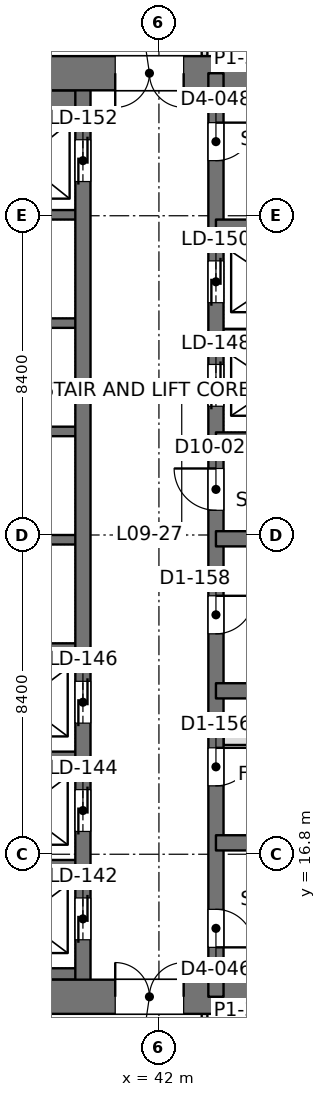
"""IFC4 building model, lengths in metres.
Left out: names, types, materials, properties, quantities, classifications, styles, units other than length and angle.
Written with IfcOpenShell. Run it as: python <this file> out.ifc"""

import sys

from ifc_helpers import new_model, si_unit, direction, frame, frame_2d, origin, place, context, subcontext, project, spatial, rectangle, extrude, element, fill, save


model = new_model("IFC4")
c1 = context("Model", 3, precision=1e-05, world=origin(), true_north=direction((0.0, 1.0)))
c2 = subcontext(c1, "Body", "Model", "MODEL_VIEW")
j1 = project(units=[si_unit("LENGTHUNIT", "METRE"), si_unit("PLANEANGLEUNIT", "RADIAN")], contexts=[c1])
p1 = place(None, origin())
s1 = spatial("IfcSite", under=j1, at=p1, CompositionType="ELEMENT")
p2 = place(p1, origin())
s2 = spatial("IfcBuilding", under=s1, at=p2, CompositionType="ELEMENT")
p3 = place(p2, frame((0.0, 0.0, 41.4)))
s3 = spatial("IfcBuildingStorey", under=s2, at=p3, CompositionType="ELEMENT", Elevation=41.4)
p4 = place(p3, frame((33.6, 13.05, 0.0), z_axis=(0.0, 0.0, 1.0), x_axis=(1.0, 0.0, 0.0)))
e1 = element("IfcWall", 1, at=p4, inside=s3, PredefinedType="SHEAR", context=c2, shape_type="SweptSolid", body=[
    extrude(rectangle(XDim=18.0, YDim=0.9, at=frame_2d((9.0, 0.0))), origin(), (0.0, 0.0, 1.0), 4.5),
])
p5 = place(p4, frame((7.25, 0.0, 0.0)))
e2 = element("IfcOpeningElement", 2, at=p5, cuts=e1, PredefinedType="OPENING", context=c2, shape_type="SweptSolid", body=[
    extrude(rectangle(XDim=1.8, YDim=2.4, at=frame_2d((0.9, 1.2))), frame((0.0, 0.46, 0.0), z_axis=(0.0, -1.0, 0.0), x_axis=(1.0, 0.0, 0.0)), (0.0, 0.0, 1.0), 0.92),
])
p6 = place(p3, frame((33.6, 37.35, 0.0), z_axis=(0.0, 0.0, 1.0), x_axis=(1.0, 0.0, 0.0)))
e3 = element("IfcWall", 3, at=p6, inside=s3, PredefinedType="SHEAR", context=c2, shape_type="SweptSolid", body=[
    extrude(rectangle(XDim=18.0, YDim=0.9, at=frame_2d((9.0, 0.0))), origin(), (0.0, 0.0, 1.0), 4.5),
])
p7 = place(p6, frame((7.25, 0.0, 0.0)))
e4 = element("IfcOpeningElement", 4, at=p7, cuts=e3, PredefinedType="OPENING", context=c2, shape_type="SweptSolid", body=[
    extrude(rectangle(XDim=1.8, YDim=2.4, at=frame_2d((0.9, 1.2))), frame((0.0, 0.46, 0.0), z_axis=(0.0, -1.0, 0.0), x_axis=(1.0, 0.0, 0.0)), (0.0, 0.0, 1.0), 0.92),
])
p8 = place(p3, frame((43.5, 13.05, 0.0), z_axis=(0.0, 0.0, 1.0), x_axis=(0.0, 1.0, 0.0)))
e5 = element("IfcWall", 5, at=p8, inside=s3, PredefinedType="SHEAR", context=c2, shape_type="SweptSolid", body=[
    extrude(rectangle(XDim=24.3, YDim=0.4, at=frame_2d((12.15, 0.0))), origin(), (0.0, 0.0, 1.0), 4.5),
])
p9 = place(p8, frame((1.3, 0.0, 0.0)))
e6 = element("IfcOpeningElement", 6, at=p9, cuts=e5, PredefinedType="OPENING", context=c2, shape_type="SweptSolid", body=[
    extrude(rectangle(XDim=1.0, YDim=2.2, at=frame_2d((0.5, 1.1))), frame((0.0, 0.21, 0.0), z_axis=(0.0, -1.0, 0.0), x_axis=(1.0, 0.0, 0.0)), (0.0, 0.0, 1.0), 0.42),
])
p10 = place(p8, frame((22.0, 0.0, 0.0)))
e7 = element("IfcOpeningElement", 7, at=p10, cuts=e5, PredefinedType="OPENING", context=c2, shape_type="SweptSolid", body=[
    extrude(rectangle(XDim=1.0, YDim=2.2, at=frame_2d((0.5, 1.1))), frame((0.0, 0.21, 0.0), z_axis=(0.0, -1.0, 0.0), x_axis=(1.0, 0.0, 0.0)), (0.0, 0.0, 1.0), 0.42),
])
p11 = place(p8, frame((5.55, 0.0, 0.0)))
e8 = element("IfcOpeningElement", 8, at=p11, cuts=e5, PredefinedType="OPENING", context=c2, shape_type="SweptSolid", body=[
    extrude(rectangle(XDim=1.0, YDim=2.2, at=frame_2d((0.5, 1.1))), frame((0.0, 0.21, 0.0), z_axis=(0.0, -1.0, 0.0), x_axis=(1.0, 0.0, 0.0)), (0.0, 0.0, 1.0), 0.42),
])
p12 = place(p8, frame((9.55, 0.0, 0.0)))
e9 = element("IfcOpeningElement", 9, at=p12, cuts=e5, PredefinedType="OPENING", context=c2, shape_type="SweptSolid", body=[
    extrude(rectangle(XDim=1.0, YDim=2.2, at=frame_2d((0.5, 1.1))), frame((0.0, 0.21, 0.0), z_axis=(0.0, -1.0, 0.0), x_axis=(1.0, 0.0, 0.0)), (0.0, 0.0, 1.0), 0.42),
])
p13 = place(p8, frame((12.8, 0.0, 0.0)))
e10 = element("IfcOpeningElement", 10, at=p13, cuts=e5, PredefinedType="OPENING", context=c2, shape_type="SweptSolid", body=[
    extrude(rectangle(XDim=1.1, YDim=2.2, at=frame_2d((0.55, 1.1))), frame((0.0, 0.21, 0.0), z_axis=(0.0, -1.0, 0.0), x_axis=(1.0, 0.0, 0.0)), (0.0, 0.0, 1.0), 0.42),
])
p14 = place(p8, frame((15.538, 0.0, 0.0)))
e11 = element("IfcOpeningElement", 11, at=p14, cuts=e5, PredefinedType="OPENING", context=c2, shape_type="SweptSolid", body=[
    extrude(rectangle(XDim=1.1, YDim=2.2, at=frame_2d((0.55, 1.1))), frame((0.0, 0.21, 0.0), z_axis=(0.0, -1.0, 0.0), x_axis=(1.0, 0.0, 0.0)), (0.0, 0.0, 1.0), 0.42),
])
p15 = place(p8, frame((18.262, 0.0, 0.0)))
e12 = element("IfcOpeningElement", 12, at=p15, cuts=e5, PredefinedType="OPENING", context=c2, shape_type="SweptSolid", body=[
    extrude(rectangle(XDim=1.1, YDim=2.2, at=frame_2d((0.55, 1.1))), frame((0.0, 0.21, 0.0), z_axis=(0.0, -1.0, 0.0), x_axis=(1.0, 0.0, 0.0)), (0.0, 0.0, 1.0), 0.42),
])
p16 = place(p3, frame((40.0, 13.05, 0.0), z_axis=(0.0, 0.0, 1.0), x_axis=(0.0, 1.0, 0.0)))
e13 = element("IfcWall", 13, at=p16, inside=s3, PredefinedType="SHEAR", context=c2, shape_type="SweptSolid", body=[
    extrude(rectangle(XDim=24.3, YDim=0.4, at=frame_2d((12.15, 0.0))), origin(), (0.0, 0.0, 1.0), 4.5),
])
p17 = place(p16, frame((1.5, 0.0, 0.0)))
e14 = element("IfcOpeningElement", 14, at=p17, cuts=e13, PredefinedType="OPENING", context=c2, shape_type="SweptSolid", body=[
    extrude(rectangle(XDim=1.1, YDim=2.2, at=frame_2d((0.55, 1.1))), frame((0.0, 0.21, 0.0), z_axis=(0.0, -1.0, 0.0), x_axis=(1.0, 0.0, 0.0)), (0.0, 0.0, 1.0), 0.42),
])
p18 = place(p16, frame((4.35, 0.0, 0.0)))
e15 = element("IfcOpeningElement", 15, at=p18, cuts=e13, PredefinedType="OPENING", context=c2, shape_type="SweptSolid", body=[
    extrude(rectangle(XDim=1.1, YDim=2.2, at=frame_2d((0.55, 1.1))), frame((0.0, 0.21, 0.0), z_axis=(0.0, -1.0, 0.0), x_axis=(1.0, 0.0, 0.0)), (0.0, 0.0, 1.0), 0.42),
])
p19 = place(p16, frame((7.2, 0.0, 0.0)))
e16 = element("IfcOpeningElement", 16, at=p19, cuts=e13, PredefinedType="OPENING", context=c2, shape_type="SweptSolid", body=[
    extrude(rectangle(XDim=1.1, YDim=2.2, at=frame_2d((0.55, 1.1))), frame((0.0, 0.21, 0.0), z_axis=(0.0, -1.0, 0.0), x_axis=(1.0, 0.0, 0.0)), (0.0, 0.0, 1.0), 0.42),
])
p20 = place(p16, frame((21.45, 0.0, 0.0)))
e17 = element("IfcOpeningElement", 17, at=p20, cuts=e13, PredefinedType="OPENING", context=c2, shape_type="SweptSolid", body=[
    extrude(rectangle(XDim=1.1, YDim=2.2, at=frame_2d((0.55, 1.1))), frame((0.0, 0.21, 0.0), z_axis=(0.0, -1.0, 0.0), x_axis=(1.0, 0.0, 0.0)), (0.0, 0.0, 1.0), 0.42),
])
for number, where, z_axis, x_axis in (
    (18, (51.15, 17.1, 0.0), (0.0, 0.0, 1.0), (-1.0, 0.0, 0.0)),
    (19, (51.15, 21.1, 0.0), (0.0, 0.0, 1.0), (-1.0, 0.0, 0.0)),
    (20, (51.15, 25.1, 0.0), (0.0, 0.0, 1.0), (-1.0, 0.0, 0.0)),
    (21, (51.15, 27.7, 0.0), (0.0, 0.0, 1.0), (-1.0, 0.0, 0.0)),
    (22, (51.15, 33.3, 0.0), (0.0, 0.0, 1.0), (-1.0, 0.0, 0.0)),
):
    element("IfcWall", number, at=place(p3, frame(where, z_axis=z_axis, x_axis=x_axis)), inside=s3, PredefinedType="SHEAR", context=c2, shape_type="SweptSolid", body=[
        extrude(rectangle(XDim=7.65, YDim=0.4, at=frame_2d((3.825, 0.0))), origin(), (0.0, 0.0, 1.0), 4.5),
    ])
p21 = place(p3, frame((46.7, 30.5, 0.0), z_axis=(0.0, 0.0, 1.0), x_axis=(-1.0, 0.0, 0.0)))
e23 = element("IfcWall", 23, at=p21, inside=s3, PredefinedType="SHEAR", context=c2, shape_type="SweptSolid", body=[
    extrude(rectangle(XDim=3.2, YDim=0.25, at=frame_2d((1.6, 0.0))), origin(), (0.0, 0.0, 1.0), 4.5),
])
p22 = place(p3, frame((40.0, 13.65, 0.0), z_axis=(0.0, 0.0, 1.0), x_axis=(-1.0, 0.0, 0.0)))
e24 = element("IfcWall", 24, at=p22, inside=s3, PredefinedType="SHEAR", context=c2, shape_type="SweptSolid", body=[
    extrude(rectangle(XDim=3.2, YDim=0.3, at=frame_2d((1.6, 0.0))), origin(), (0.0, 0.0, 1.0), 4.5),
])
for number, where, z_axis, x_axis in (
    (25, (40.0, 16.525, 0.0), (0.0, 0.0, 1.0), (-1.0, 0.0, 0.0)),
    (26, (40.0, 19.375, 0.0), (0.0, 0.0, 1.0), (-1.0, 0.0, 0.0)),
    (27, (40.0, 22.225, 0.0), (0.0, 0.0, 1.0), (-1.0, 0.0, 0.0)),
    (28, (40.0, 25.075, 0.0), (0.0, 0.0, 1.0), (-1.0, 0.0, 0.0)),
    (29, (40.0, 27.925, 0.0), (0.0, 0.0, 1.0), (-1.0, 0.0, 0.0)),
    (30, (40.0, 30.775, 0.0), (0.0, 0.0, 1.0), (-1.0, 0.0, 0.0)),
    (31, (40.0, 33.625, 0.0), (0.0, 0.0, 1.0), (-1.0, 0.0, 0.0)),
):
    element("IfcWall", number, at=place(p3, frame(where, z_axis=z_axis, x_axis=x_axis)), inside=s3, PredefinedType="SHEAR", context=c2, shape_type="SweptSolid", body=[
        extrude(rectangle(XDim=3.2, YDim=0.25, at=frame_2d((1.6, 0.0))), origin(), (0.0, 0.0, 1.0), 4.5),
    ])
p23 = place(p3, frame((40.0, 36.625, 0.0), z_axis=(0.0, 0.0, 1.0), x_axis=(-1.0, 0.0, 0.0)))
e32 = element("IfcWall", 32, at=p23, inside=s3, PredefinedType="SHEAR", context=c2, shape_type="SweptSolid", body=[
    extrude(rectangle(XDim=3.2, YDim=0.55, at=frame_2d((1.6, 0.0))), origin(), (0.0, 0.0, 1.0), 4.5),
])
p24 = place(p3, frame((43.2, 10.474, 0.0), z_axis=(0.0, 0.0, 1.0), x_axis=(0.0, 1.0, 0.0)))
e33 = element("IfcWall", 33, at=p24, inside=s3, PredefinedType="PARTITIONING", context=c2, shape_type="SweptSolid", body=[
    extrude(rectangle(XDim=2.128, YDim=0.15, at=frame_2d((1.064, 0.0))), origin(), (0.0, 0.0, 1.0), 4.34),
])
p25 = place(p24, frame((0.526, 0.0, 0.0)))
e34 = element("IfcOpeningElement", 34, at=p25, cuts=e33, PredefinedType="OPENING", context=c2, shape_type="SweptSolid", body=[
    extrude(rectangle(XDim=1.0, YDim=2.2, at=frame_2d((0.5, 1.1))), frame((0.0, 0.085, 0.0), z_axis=(0.0, -1.0, 0.0), x_axis=(1.0, 0.0, 0.0)), (0.0, 0.0, 1.0), 0.17),
])
p26 = place(p3, frame((43.2, 37.8, 0.0), z_axis=(0.0, 0.0, 1.0), x_axis=(0.0, 1.0, 0.0)))
e35 = element("IfcWall", 35, at=p26, inside=s3, PredefinedType="PARTITIONING", context=c2, shape_type="SweptSolid", body=[
    extrude(rectangle(XDim=2.126, YDim=0.15, at=frame_2d((1.063, 0.0))), origin(), (0.0, 0.0, 1.0), 4.34),
])
p27 = place(p26, frame((0.6, 0.0, 0.0)))
e36 = element("IfcOpeningElement", 36, at=p27, cuts=e35, PredefinedType="OPENING", context=c2, shape_type="SweptSolid", body=[
    extrude(rectangle(XDim=1.0, YDim=2.2, at=frame_2d((0.5, 1.1))), frame((0.0, 0.085, 0.0), z_axis=(0.0, -1.0, 0.0), x_axis=(1.0, 0.0, 0.0)), (0.0, 0.0, 1.0), 0.17),
])
p28 = place(p3, frame((43.7, 19.8, 0.0), z_axis=(0.0, 0.0, 1.0), x_axis=(1.0, 0.0, 0.0)))
e37 = element("IfcWall", 37, at=p28, inside=s3, PredefinedType="PARTITIONING", context=c2, shape_type="SweptSolid", body=[
    extrude(rectangle(XDim=6.6, YDim=0.25, at=frame_2d((3.3, 0.0))), origin(), (0.0, 0.0, 1.0), 4.3),
])
p29 = place(p28, frame((2.825, 0.0, 0.0)))
e38 = element("IfcOpeningElement", 38, at=p29, cuts=e37, PredefinedType="OPENING", context=c2, shape_type="SweptSolid", body=[
    extrude(rectangle(XDim=0.9, YDim=2.2, at=frame_2d((0.45, 1.1))), frame((0.0, 0.135, 0.0), z_axis=(0.0, -1.0, 0.0), x_axis=(1.0, 0.0, 0.0)), (0.0, 0.0, 1.0), 0.27),
])
p30 = place(p5, origin())
e39 = element("IfcDoor", 39, at=p30, inside=s3, OperationType="DOUBLE_DOOR_SINGLE_SWING", PredefinedType="DOOR", context=c2, shape_type="SweptSolid", body=[
    extrude(rectangle(XDim=1.8, YDim=2.4, at=frame_2d((0.9, 1.2))), frame((0.0, 0.025, 0.0), z_axis=(0.0, -1.0, 0.0), x_axis=(1.0, 0.0, 0.0)), (0.0, 0.0, 1.0), 0.05),
])
fill(e2, e39)
p31 = place(p7, frame((1.8, 0.0, 0.0), z_axis=(0.0, 0.0, 1.0), x_axis=(-1.0, 0.0, 0.0)))
e40 = element("IfcDoor", 40, at=p31, inside=s3, OperationType="DOUBLE_DOOR_SINGLE_SWING", PredefinedType="DOOR", context=c2, shape_type="SweptSolid", body=[
    extrude(rectangle(XDim=1.8, YDim=2.4, at=frame_2d((0.9, 1.2))), frame((0.0, 0.025, 0.0), z_axis=(0.0, -1.0, 0.0), x_axis=(1.0, 0.0, 0.0)), (0.0, 0.0, 1.0), 0.05),
])
fill(e4, e40)
p32 = place(p9, frame((1.0, 0.0, 0.0), z_axis=(0.0, 0.0, 1.0), x_axis=(-1.0, 0.0, 0.0)))
e41 = element("IfcDoor", 41, at=p32, inside=s3, OperationType="SINGLE_SWING_RIGHT", PredefinedType="DOOR", context=c2, shape_type="SweptSolid", body=[
    extrude(rectangle(XDim=1.0, YDim=2.2, at=frame_2d((0.5, 1.1))), frame((0.0, 0.025, 0.0), z_axis=(0.0, -1.0, 0.0), x_axis=(1.0, 0.0, 0.0)), (0.0, 0.0, 1.0), 0.05),
])
fill(e6, e41)
p33 = place(p10, frame((1.0, 0.0, 0.0), z_axis=(0.0, 0.0, 1.0), x_axis=(-1.0, 0.0, 0.0)))
e42 = element("IfcDoor", 42, at=p33, inside=s3, OperationType="SINGLE_SWING_LEFT", PredefinedType="DOOR", context=c2, shape_type="SweptSolid", body=[
    extrude(rectangle(XDim=1.0, YDim=2.2, at=frame_2d((0.5, 1.1))), frame((0.0, 0.025, 0.0), z_axis=(0.0, -1.0, 0.0), x_axis=(1.0, 0.0, 0.0)), (0.0, 0.0, 1.0), 0.05),
])
fill(e7, e42)
p34 = place(p11, frame((1.0, 0.0, 0.0), z_axis=(0.0, 0.0, 1.0), x_axis=(-1.0, 0.0, 0.0)))
e43 = element("IfcDoor", 43, at=p34, inside=s3, OperationType="SINGLE_SWING_LEFT", PredefinedType="DOOR", context=c2, shape_type="SweptSolid", body=[
    extrude(rectangle(XDim=1.0, YDim=2.2, at=frame_2d((0.5, 1.1))), frame((0.0, 0.025, 0.0), z_axis=(0.0, -1.0, 0.0), x_axis=(1.0, 0.0, 0.0)), (0.0, 0.0, 1.0), 0.05),
])
fill(e8, e43)
p35 = place(p12, frame((1.0, 0.0, 0.0), z_axis=(0.0, 0.0, 1.0), x_axis=(-1.0, 0.0, 0.0)))
e44 = element("IfcDoor", 44, at=p35, inside=s3, OperationType="SINGLE_SWING_LEFT", PredefinedType="DOOR", context=c2, shape_type="SweptSolid", body=[
    extrude(rectangle(XDim=1.0, YDim=2.2, at=frame_2d((0.5, 1.1))), frame((0.0, 0.025, 0.0), z_axis=(0.0, -1.0, 0.0), x_axis=(1.0, 0.0, 0.0)), (0.0, 0.0, 1.0), 0.05),
])
fill(e9, e44)
p36 = place(p13, origin())
e45 = element("IfcDoor", 45, at=p36, inside=s3, OperationType="SINGLE_SWING_RIGHT", PredefinedType="DOOR", context=c2, shape_type="SweptSolid", body=[
    extrude(rectangle(XDim=1.1, YDim=2.2, at=frame_2d((0.55, 1.1))), frame((0.0, 0.025, 0.0), z_axis=(0.0, -1.0, 0.0), x_axis=(1.0, 0.0, 0.0)), (0.0, 0.0, 1.0), 0.05),
])
fill(e10, e45)
p37 = place(p17, origin())
e46 = element("IfcDoor", 46, at=p37, inside=s3, OperationType="DOUBLE_DOOR_SLIDING", PredefinedType="DOOR", context=c2, shape_type="SweptSolid", body=[
    extrude(rectangle(XDim=1.1, YDim=2.2, at=frame_2d((0.55, 1.1))), frame((0.0, 0.025, 0.0), z_axis=(0.0, -1.0, 0.0), x_axis=(1.0, 0.0, 0.0)), (0.0, 0.0, 1.0), 0.05),
])
fill(e14, e46)
p38 = place(p18, origin())
e47 = element("IfcDoor", 47, at=p38, inside=s3, OperationType="DOUBLE_DOOR_SLIDING", PredefinedType="DOOR", context=c2, shape_type="SweptSolid", body=[
    extrude(rectangle(XDim=1.1, YDim=2.2, at=frame_2d((0.55, 1.1))), frame((0.0, 0.025, 0.0), z_axis=(0.0, -1.0, 0.0), x_axis=(1.0, 0.0, 0.0)), (0.0, 0.0, 1.0), 0.05),
])
fill(e15, e47)
p39 = place(p19, origin())
e48 = element("IfcDoor", 48, at=p39, inside=s3, OperationType="DOUBLE_DOOR_SLIDING", PredefinedType="DOOR", context=c2, shape_type="SweptSolid", body=[
    extrude(rectangle(XDim=1.1, YDim=2.2, at=frame_2d((0.55, 1.1))), frame((0.0, 0.025, 0.0), z_axis=(0.0, -1.0, 0.0), x_axis=(1.0, 0.0, 0.0)), (0.0, 0.0, 1.0), 0.05),
])
fill(e16, e48)
p40 = place(p20, origin())
e49 = element("IfcDoor", 49, at=p40, inside=s3, OperationType="DOUBLE_DOOR_SLIDING", PredefinedType="DOOR", context=c2, shape_type="SweptSolid", body=[
    extrude(rectangle(XDim=1.1, YDim=2.2, at=frame_2d((0.55, 1.1))), frame((0.0, 0.025, 0.0), z_axis=(0.0, -1.0, 0.0), x_axis=(1.0, 0.0, 0.0)), (0.0, 0.0, 1.0), 0.05),
])
fill(e17, e49)
p41 = place(p14, origin())
e50 = element("IfcDoor", 50, at=p41, inside=s3, OperationType="DOUBLE_DOOR_SLIDING", PredefinedType="DOOR", context=c2, shape_type="SweptSolid", body=[
    extrude(rectangle(XDim=1.1, YDim=2.2, at=frame_2d((0.55, 1.1))), frame((0.0, 0.025, 0.0), z_axis=(0.0, -1.0, 0.0), x_axis=(1.0, 0.0, 0.0)), (0.0, 0.0, 1.0), 0.05),
])
fill(e11, e50)
p42 = place(p15, origin())
e51 = element("IfcDoor", 51, at=p42, inside=s3, OperationType="DOUBLE_DOOR_SLIDING", PredefinedType="DOOR", context=c2, shape_type="SweptSolid", body=[
    extrude(rectangle(XDim=1.1, YDim=2.2, at=frame_2d((0.55, 1.1))), frame((0.0, 0.025, 0.0), z_axis=(0.0, -1.0, 0.0), x_axis=(1.0, 0.0, 0.0)), (0.0, 0.0, 1.0), 0.05),
])
fill(e12, e51)
save(model, sys.argv[1])
